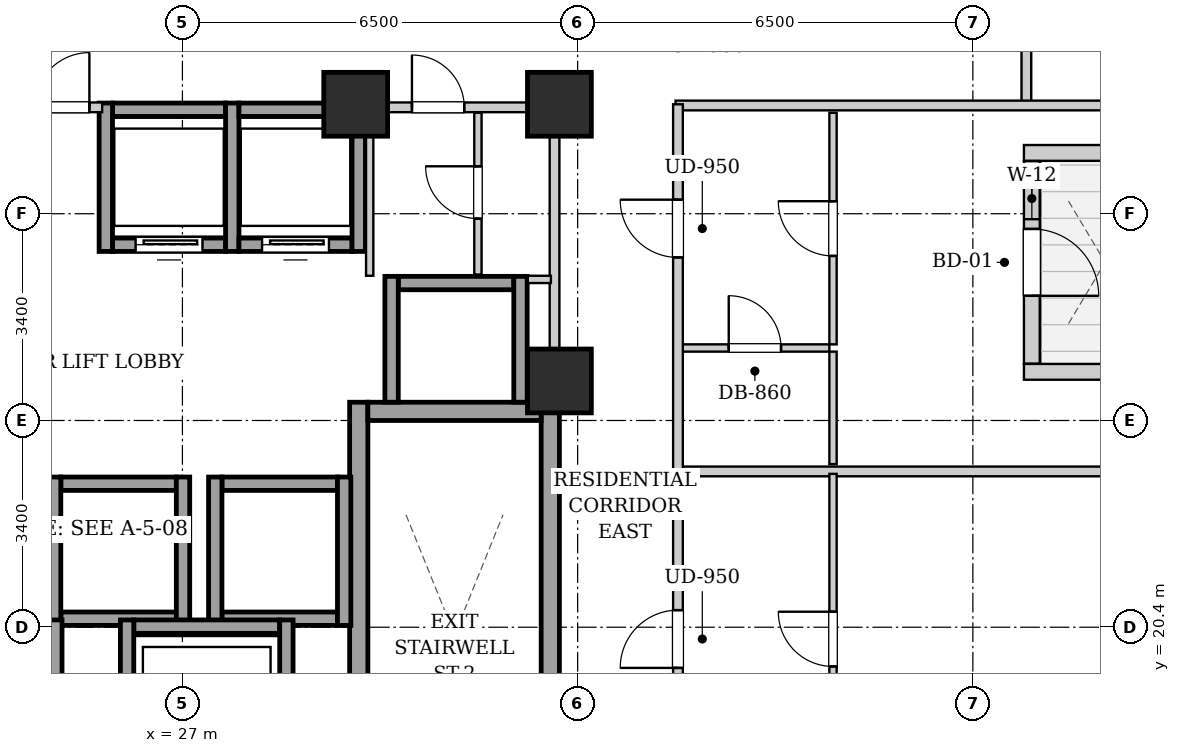
"""IFC4 building model, lengths in metres.
Left out: names, types, materials, properties, quantities, classifications, styles, units other than length and angle.
Written with IfcOpenShell. Run it as: python <this file> out.ifc"""

import sys

from ifc_helpers import new_model, si_unit, direction, frame, frame_2d, origin, origin_2d, place, context, subcontext, project, spatial, rectangle, extrude, element, fill, save


model = new_model("IFC4")
c1 = context("Model", 3, precision=1e-05, world=origin(), true_north=direction((0.0, 1.0)))
c2 = subcontext(c1, "Body", "Model", "MODEL_VIEW")
j1 = project(units=[si_unit("LENGTHUNIT", "METRE"), si_unit("PLANEANGLEUNIT", "RADIAN")], contexts=[c1])
p1 = place(None, origin())
s1 = spatial("IfcSite", under=j1, at=p1, CompositionType="ELEMENT")
p2 = place(p1, origin())
s2 = spatial("IfcBuilding", under=s1, at=p2, CompositionType="ELEMENT")
p3 = place(p2, frame((0.0, 0.0, 110.3)))
s3 = spatial("IfcBuildingStorey", under=s2, at=p3, CompositionType="ELEMENT", Elevation=110.3)
for number, where, z_axis, x_axis in (
    (1, (29.85, 29.0, 0.0), (0.0, 0.0, 1.0), (1.0, 0.0, 0.0)),
    (2, (33.2, 29.0, 0.0), (0.0, 0.0, 1.0), (1.0, 0.0, 0.0)),
    (3, (33.2, 24.45, 0.0), (0.0, 0.0, 1.0), (1.0, 0.0, 0.0)),
):
    element("IfcColumn", number, at=place(p3, frame(where, z_axis=z_axis, x_axis=x_axis)), inside=s3, PredefinedType="COLUMN", context=c2, shape_type="SweptSolid", body=[
        extrude(rectangle(XDim=1.05, YDim=1.05, at=origin_2d()), origin(), (0.0, 0.0, 1.0), 3.2),
    ])
p4 = place(p3, frame((43.24, 28.2, 0.0), z_axis=(0.0, 0.0, 1.0), x_axis=(-1.0, 0.0, 0.0)))
e4 = element("IfcWall", 4, at=p4, inside=s3, PredefinedType="SOLIDWALL", context=c2, shape_type="SweptSolid", body=[
    extrude(rectangle(XDim=2.4, YDim=0.26, at=frame_2d((1.2, 0.0))), origin(), (0.0, 0.0, 1.0), 2.94),
])
p5 = place(p3, frame((40.97, 28.066, 0.0), z_axis=(0.0, 0.0, 1.0), x_axis=(0.0, -1.0, 0.0)))
e5 = element("IfcWall", 5, at=p5, inside=s3, PredefinedType="SOLIDWALL", context=c2, shape_type="SweptSolid", body=[
    extrude(rectangle(XDim=3.332, YDim=0.26, at=frame_2d((1.666, 0.0))), origin(), (0.0, 0.0, 1.0), 2.94),
])
p6 = place(p5, frame((1.116, 0.0, 0.0)))
e6 = element("IfcOpeningElement", 6, at=p6, cuts=e5, PredefinedType="OPENING", context=c2, shape_type="SweptSolid", body=[
    extrude(rectangle(XDim=1.1, YDim=2.0, at=frame_2d((0.55, 1.0))), frame((0.0, 0.14, 0.0), z_axis=(0.0, -1.0, 0.0), x_axis=(1.0, 0.0, 0.0)), (0.0, 0.0, 1.0), 0.28),
])
p7 = place(p5, frame((0.276, 0.0, 0.55)))
e7 = element("IfcOpeningElement", 7, at=p7, cuts=e5, PredefinedType="OPENING", context=c2, shape_type="SweptSolid", body=[
    extrude(rectangle(XDim=0.68, YDim=1.2, at=frame_2d((0.34, 0.6))), frame((0.0, 0.14, 0.0), z_axis=(0.0, -1.0, 0.0), x_axis=(1.0, 0.0, 0.0)), (0.0, 0.0, 1.0), 0.28),
])
p8 = place(p3, frame((40.84, 24.6, 0.0), z_axis=(0.0, 0.0, 1.0), x_axis=(1.0, 0.0, 0.0)))
e8 = element("IfcWall", 8, at=p8, inside=s3, PredefinedType="SOLIDWALL", context=c2, shape_type="SweptSolid", body=[
    extrude(rectangle(XDim=2.4, YDim=0.26, at=frame_2d((1.2, 0.0))), origin(), (0.0, 0.0, 1.0), 2.94),
])
for number, where, z_axis, x_axis in (
    (9, (29.9, 15.1, 0.0), (0.0, 0.0, 1.0), (0.0, 1.0, 0.0)),
    (10, (33.05, 15.1, 0.0), (0.0, 0.0, 1.0), (0.0, 1.0, 0.0)),
):
    element("IfcWall", number, at=place(p3, frame(where, z_axis=z_axis, x_axis=x_axis)), inside=s3, PredefinedType="SHEAR", context=c2, shape_type="SweptSolid", body=[
        extrude(rectangle(XDim=9.0, YDim=0.3, at=frame_2d((4.5, 0.0))), origin(), (0.0, 0.0, 1.0), 2.94),
    ])
p9 = place(p3, frame((30.05, 23.95, 0.0), z_axis=(0.0, 0.0, 1.0), x_axis=(1.0, 0.0, 0.0)))
e11 = element("IfcWall", 11, at=p9, inside=s3, PredefinedType="SHEAR", context=c2, shape_type="SweptSolid", body=[
    extrude(rectangle(XDim=2.85, YDim=0.3, at=frame_2d((1.425, 0.0))), origin(), (0.0, 0.0, 1.0), 2.94),
])
p10 = place(p3, frame((25.85, 26.69, 0.0), z_axis=(0.0, 0.0, 1.0), x_axis=(1.0, 0.0, 0.0)))
e12 = element("IfcWall", 12, at=p10, inside=s3, PredefinedType="SHEAR", context=c2, shape_type="SweptSolid", body=[
    extrude(rectangle(XDim=1.86, YDim=0.22, at=frame_2d((0.93, 0.0))), origin(), (0.0, 0.0, 1.0), 2.94),
])
p11 = place(p10, frame((0.38, 0.0, 0.0)))
e13 = element("IfcOpeningElement", 13, at=p11, cuts=e12, PredefinedType="OPENING", context=c2, shape_type="SweptSolid", body=[
    extrude(rectangle(XDim=1.1, YDim=2.15, at=frame_2d((0.55, 1.075))), frame((0.0, 0.12, 0.0), z_axis=(0.0, -1.0, 0.0), x_axis=(1.0, 0.0, 0.0)), (0.0, 0.0, 1.0), 0.24),
])
p12 = place(p3, frame((25.85, 28.91, 0.0), z_axis=(0.0, 0.0, 1.0), x_axis=(1.0, 0.0, 0.0)))
e14 = element("IfcWall", 14, at=p12, inside=s3, PredefinedType="SHEAR", context=c2, shape_type="SweptSolid", body=[
    extrude(rectangle(XDim=1.86, YDim=0.22, at=frame_2d((0.93, 0.0))), origin(), (0.0, 0.0, 1.0), 2.94),
])
for number, where, z_axis, x_axis in (
    (15, (25.74, 26.58, 0.0), (0.0, 0.0, 1.0), (0.0, 1.0, 0.0)),
    (16, (27.82, 26.58, 0.0), (0.0, 0.0, 1.0), (0.0, 1.0, 0.0)),
):
    element("IfcWall", number, at=place(p3, frame(where, z_axis=z_axis, x_axis=x_axis)), inside=s3, PredefinedType="SHEAR", context=c2, shape_type="SweptSolid", body=[
        extrude(rectangle(XDim=2.44, YDim=0.22, at=frame_2d((1.22, 0.0))), origin(), (0.0, 0.0, 1.0), 2.94),
    ])
p13 = place(p3, frame((27.93, 26.69, 0.0), z_axis=(0.0, 0.0, 1.0), x_axis=(1.0, 0.0, 0.0)))
e17 = element("IfcWall", 17, at=p13, inside=s3, PredefinedType="SHEAR", context=c2, shape_type="SweptSolid", body=[
    extrude(rectangle(XDim=1.86, YDim=0.22, at=frame_2d((0.93, 0.0))), origin(), (0.0, 0.0, 1.0), 2.94),
])
p14 = place(p13, frame((0.38, 0.0, 0.0)))
e18 = element("IfcOpeningElement", 18, at=p14, cuts=e17, PredefinedType="OPENING", context=c2, shape_type="SweptSolid", body=[
    extrude(rectangle(XDim=1.1, YDim=2.15, at=frame_2d((0.55, 1.075))), frame((0.0, 0.12, 0.0), z_axis=(0.0, -1.0, 0.0), x_axis=(1.0, 0.0, 0.0)), (0.0, 0.0, 1.0), 0.24),
])
p15 = place(p3, frame((27.93, 28.91, 0.0), z_axis=(0.0, 0.0, 1.0), x_axis=(1.0, 0.0, 0.0)))
e19 = element("IfcWall", 19, at=p15, inside=s3, PredefinedType="SHEAR", context=c2, shape_type="SweptSolid", body=[
    extrude(rectangle(XDim=1.86, YDim=0.22, at=frame_2d((0.93, 0.0))), origin(), (0.0, 0.0, 1.0), 2.94),
])
p16 = place(p3, frame((29.9, 26.58, 0.0), z_axis=(0.0, 0.0, 1.0), x_axis=(0.0, 1.0, 0.0)))
e20 = element("IfcWall", 20, at=p16, inside=s3, PredefinedType="SHEAR", context=c2, shape_type="SweptSolid", body=[
    extrude(rectangle(XDim=2.44, YDim=0.22, at=frame_2d((1.22, 0.0))), origin(), (0.0, 0.0, 1.0), 2.94),
])
for number, where, z_axis, x_axis in (
    (21, (25.0, 20.54, 0.0), (0.0, 0.0, 1.0), (1.0, 0.0, 0.0)),
    (22, (25.0, 22.76, 0.0), (0.0, 0.0, 1.0), (1.0, 0.0, 0.0)),
):
    element("IfcWall", number, at=place(p3, frame(where, z_axis=z_axis, x_axis=x_axis)), inside=s3, PredefinedType="SHEAR", context=c2, shape_type="SweptSolid", body=[
        extrude(rectangle(XDim=1.9, YDim=0.22, at=frame_2d((0.95, 0.0))), origin(), (0.0, 0.0, 1.0), 2.94),
    ])
for number, where, z_axis, x_axis in (
    (23, (24.89, 20.43, 0.0), (0.0, 0.0, 1.0), (0.0, 1.0, 0.0)),
    (24, (27.01, 20.43, 0.0), (0.0, 0.0, 1.0), (0.0, 1.0, 0.0)),
):
    element("IfcWall", number, at=place(p3, frame(where, z_axis=z_axis, x_axis=x_axis)), inside=s3, PredefinedType="SHEAR", context=c2, shape_type="SweptSolid", body=[
        extrude(rectangle(XDim=2.44, YDim=0.22, at=frame_2d((1.22, 0.0))), origin(), (0.0, 0.0, 1.0), 2.94),
    ])
for number, where, z_axis, x_axis in (
    (25, (27.65, 20.54, 0.0), (0.0, 0.0, 1.0), (1.0, 0.0, 0.0)),
    (26, (27.65, 22.76, 0.0), (0.0, 0.0, 1.0), (1.0, 0.0, 0.0)),
):
    element("IfcWall", number, at=place(p3, frame(where, z_axis=z_axis, x_axis=x_axis)), inside=s3, PredefinedType="SHEAR", context=c2, shape_type="SweptSolid", body=[
        extrude(rectangle(XDim=1.9, YDim=0.22, at=frame_2d((0.95, 0.0))), origin(), (0.0, 0.0, 1.0), 2.94),
    ])
for number, where, z_axis, x_axis in (
    (27, (27.54, 20.43, 0.0), (0.0, 0.0, 1.0), (0.0, 1.0, 0.0)),
    (28, (29.66, 20.43, 0.0), (0.0, 0.0, 1.0), (0.0, 1.0, 0.0)),
):
    element("IfcWall", number, at=place(p3, frame(where, z_axis=z_axis, x_axis=x_axis)), inside=s3, PredefinedType="SHEAR", context=c2, shape_type="SweptSolid", body=[
        extrude(rectangle(XDim=2.44, YDim=0.22, at=frame_2d((1.22, 0.0))), origin(), (0.0, 0.0, 1.0), 2.94),
    ])
p17 = place(p3, frame((30.55, 26.06, 0.0), z_axis=(0.0, 0.0, 1.0), x_axis=(1.0, 0.0, 0.0)))
e29 = element("IfcWall", 29, at=p17, inside=s3, PredefinedType="SHEAR", context=c2, shape_type="SweptSolid", body=[
    extrude(rectangle(XDim=1.9, YDim=0.22, at=frame_2d((0.95, 0.0))), origin(), (0.0, 0.0, 1.0), 2.94),
])
for number, where, z_axis, x_axis in (
    (30, (30.44, 24.1, 0.0), (0.0, 0.0, 1.0), (0.0, 1.0, 0.0)),
    (31, (32.56, 24.1, 0.0), (0.0, 0.0, 1.0), (0.0, 1.0, 0.0)),
):
    element("IfcWall", number, at=place(p3, frame(where, z_axis=z_axis, x_axis=x_axis)), inside=s3, PredefinedType="SHEAR", context=c2, shape_type="SweptSolid", body=[
        extrude(rectangle(XDim=2.07, YDim=0.22, at=frame_2d((1.035, 0.0))), origin(), (0.0, 0.0, 1.0), 2.94),
    ])
p18 = place(p3, frame((24.91, 17.98, 0.0), z_axis=(0.0, 0.0, 1.0), x_axis=(0.0, 1.0, 0.0)))
e32 = element("IfcWall", 32, at=p18, inside=s3, PredefinedType="SHEAR", context=c2, shape_type="SweptSolid", body=[
    extrude(rectangle(XDim=2.54, YDim=0.22, at=frame_2d((1.27, 0.0))), origin(), (0.0, 0.0, 1.0), 2.94),
])
p19 = place(p3, frame((26.2, 20.41, 0.0), z_axis=(0.0, 0.0, 1.0), x_axis=(1.0, 0.0, 0.0)))
e33 = element("IfcWall", 33, at=p19, inside=s3, PredefinedType="SHEAR", context=c2, shape_type="SweptSolid", body=[
    extrude(rectangle(XDim=2.4, YDim=0.22, at=frame_2d((1.2, 0.0))), origin(), (0.0, 0.0, 1.0), 2.94),
])
for number, where, z_axis, x_axis in (
    (34, (26.09, 17.98, 0.0), (0.0, 0.0, 1.0), (0.0, 1.0, 0.0)),
    (35, (28.71, 17.98, 0.0), (0.0, 0.0, 1.0), (0.0, 1.0, 0.0)),
):
    element("IfcWall", number, at=place(p3, frame(where, z_axis=z_axis, x_axis=x_axis)), inside=s3, PredefinedType="SHEAR", context=c2, shape_type="SweptSolid", body=[
        extrude(rectangle(XDim=2.54, YDim=0.22, at=frame_2d((1.27, 0.0))), origin(), (0.0, 0.0, 1.0), 2.94),
    ])
p20 = place(p3, frame((33.12, 24.12, 0.0), z_axis=(0.0, 0.0, 1.0), x_axis=(0.0, 1.0, 0.0)))
e36 = element("IfcWall", 36, at=p20, inside=s3, PredefinedType="PARTITIONING", context=c2, shape_type="SweptSolid", body=[
    extrude(rectangle(XDim=4.76, YDim=0.16, at=frame_2d((2.38, 0.0))), origin(), (0.0, 0.0, 1.0), 2.94),
])
p21 = place(p3, frame((24.36, 28.95, 0.0), z_axis=(0.0, 0.0, 1.0), x_axis=(1.0, 0.0, 0.0)))
e37 = element("IfcWall", 37, at=p21, inside=s3, PredefinedType="PARTITIONING", context=c2, shape_type="SweptSolid", body=[
    extrude(rectangle(XDim=1.32, YDim=0.16, at=frame_2d((0.66, 0.0))), origin(), (0.0, 0.0, 1.0), 2.313),
])
p22 = place(p21, frame((0.21, 0.0, 0.0)))
e38 = element("IfcOpeningElement", 38, at=p22, cuts=e37, PredefinedType="OPENING", context=c2, shape_type="SweptSolid", body=[
    extrude(rectangle(XDim=0.9, YDim=2.05, at=frame_2d((0.45, 1.025))), frame((0.0, 0.09, 0.0), z_axis=(0.0, -1.0, 0.0), x_axis=(1.0, 0.0, 0.0)), (0.0, 0.0, 1.0), 0.18),
])
p23 = place(p3, frame((30.08, 26.18, 0.0), z_axis=(0.0, 0.0, 1.0), x_axis=(0.0, 1.0, 0.0)))
e39 = element("IfcWall", 39, at=p23, inside=s3, PredefinedType="PARTITIONING", context=c2, shape_type="SweptSolid", body=[
    extrude(rectangle(XDim=2.68, YDim=0.12, at=frame_2d((1.34, 0.0))), origin(), (0.0, 0.0, 1.0), 2.94),
])
p24 = place(p3, frame((32.68, 26.12, 0.0), z_axis=(0.0, 0.0, 1.0), x_axis=(1.0, 0.0, 0.0)))
e40 = element("IfcWall", 40, at=p24, inside=s3, PredefinedType="PARTITIONING", context=c2, shape_type="SweptSolid", body=[
    extrude(rectangle(XDim=0.38, YDim=0.12, at=frame_2d((0.19, 0.0))), origin(), (0.0, 0.0, 1.0), 2.94),
])
p25 = place(p3, frame((31.86, 26.2, 0.0), z_axis=(0.0, 0.0, 1.0), x_axis=(0.0, 1.0, 0.0)))
e41 = element("IfcWall", 41, at=p25, inside=s3, PredefinedType="PARTITIONING", context=c2, shape_type="SweptSolid", body=[
    extrude(rectangle(XDim=2.66, YDim=0.12, at=frame_2d((1.33, 0.0))), origin(), (0.0, 0.0, 1.0), 2.94),
])
p26 = place(p25, frame((0.92, 0.0, 0.0)))
e42 = element("IfcOpeningElement", 42, at=p26, cuts=e41, PredefinedType="OPENING", context=c2, shape_type="SweptSolid", body=[
    extrude(rectangle(XDim=0.86, YDim=2.05, at=frame_2d((0.43, 1.025))), frame((0.0, 0.07, 0.0), z_axis=(0.0, -1.0, 0.0), x_axis=(1.0, 0.0, 0.0)), (0.0, 0.0, 1.0), 0.14),
])
p27 = place(p3, frame((30.08, 28.95, 0.0), z_axis=(0.0, 0.0, 1.0), x_axis=(1.0, 0.0, 0.0)))
e43 = element("IfcWall", 43, at=p27, inside=s3, PredefinedType="PARTITIONING", context=c2, shape_type="SweptSolid", body=[
    extrude(rectangle(XDim=2.96, YDim=0.16, at=frame_2d((1.48, 0.0))), origin(), (0.0, 0.0, 1.0), 2.94),
])
p28 = place(p27, frame((0.695, 0.0, 0.0)))
e44 = element("IfcOpeningElement", 44, at=p28, cuts=e43, PredefinedType="OPENING", context=c2, shape_type="SweptSolid", body=[
    extrude(rectangle(XDim=0.86, YDim=2.05, at=frame_2d((0.43, 1.025))), frame((0.0, 0.09, 0.0), z_axis=(0.0, -1.0, 0.0), x_axis=(1.0, 0.0, 0.0)), (0.0, 0.0, 1.0), 0.18),
])
p29 = place(p3, frame((40.88, 28.98, 0.0), z_axis=(0.0, 0.0, 1.0), x_axis=(0.0, 1.0, 0.0)))
e45 = element("IfcWall", 45, at=p29, inside=s3, PredefinedType="PARTITIONING", context=c2, shape_type="SweptSolid", body=[
    extrude(rectangle(XDim=1.74, YDim=0.16, at=frame_2d((0.87, 0.0))), origin(), (0.0, 0.0, 1.0), 2.94),
])
p30 = place(p3, frame((35.11, 28.98, 0.0), z_axis=(0.0, 0.0, 1.0), x_axis=(1.0, 0.0, 0.0)))
e46 = element("IfcWall", 46, at=p30, inside=s3, PredefinedType="PARTITIONING", context=c2, shape_type="SweptSolid", body=[
    extrude(rectangle(XDim=8.01, YDim=0.16, at=frame_2d((4.005, 0.0))), origin(), (0.0, 0.0, 1.0), 2.313),
])
p31 = place(p3, frame((35.19, 22.962, 0.0), z_axis=(0.0, 0.0, 1.0), x_axis=(1.0, 0.0, 0.0)))
e47 = element("IfcWall", 47, at=p31, inside=s3, PredefinedType="PARTITIONING", context=c2, shape_type="SweptSolid", body=[
    extrude(rectangle(XDim=7.93, YDim=0.16, at=frame_2d((3.965, 0.0))), origin(), (0.0, 0.0, 1.0), 2.94),
])
p32 = place(p3, frame((37.7, 17.489, 0.0), z_axis=(0.0, 0.0, 1.0), x_axis=(0.0, 1.0, 0.0)))
e48 = element("IfcWall", 48, at=p32, inside=s3, PredefinedType="PARTITIONING", context=c2, shape_type="SweptSolid", body=[
    extrude(rectangle(XDim=5.433, YDim=0.12, at=frame_2d((2.717, 0.0))), origin(), (0.0, 0.0, 1.0), 2.94),
])
p33 = place(p32, frame((2.266, 0.0, 0.0)))
e49 = element("IfcOpeningElement", 49, at=p33, cuts=e48, PredefinedType="OPENING", context=c2, shape_type="SweptSolid", body=[
    extrude(rectangle(XDim=0.9, YDim=2.05, at=frame_2d((0.45, 1.025))), frame((0.0, 0.07, 0.0), z_axis=(0.0, -1.0, 0.0), x_axis=(1.0, 0.0, 0.0)), (0.0, 0.0, 1.0), 0.14),
])
p34 = place(p3, frame((35.19, 24.992, 0.0), z_axis=(0.0, 0.0, 1.0), x_axis=(1.0, 0.0, 0.0)))
e50 = element("IfcWall", 50, at=p34, inside=s3, PredefinedType="PARTITIONING", context=c2, shape_type="SweptSolid", body=[
    extrude(rectangle(XDim=2.45, YDim=0.12, at=frame_2d((1.225, 0.0))), origin(), (0.0, 0.0, 1.0), 2.94),
])
p35 = place(p34, frame((0.795, 0.0, 0.0)))
e51 = element("IfcOpeningElement", 51, at=p35, cuts=e50, PredefinedType="OPENING", context=c2, shape_type="SweptSolid", body=[
    extrude(rectangle(XDim=0.86, YDim=2.05, at=frame_2d((0.43, 1.025))), frame((0.0, 0.07, 0.0), z_axis=(0.0, -1.0, 0.0), x_axis=(1.0, 0.0, 0.0)), (0.0, 0.0, 1.0), 0.14),
])
p36 = place(p3, frame((37.7, 23.082, 0.0), z_axis=(0.0, 0.0, 1.0), x_axis=(0.0, 1.0, 0.0)))
e52 = element("IfcWall", 52, at=p36, inside=s3, PredefinedType="PARTITIONING", context=c2, shape_type="SweptSolid", body=[
    extrude(rectangle(XDim=1.85, YDim=0.12, at=frame_2d((0.925, 0.0))), origin(), (0.0, 0.0, 1.0), 2.94),
])
p37 = place(p3, frame((37.7, 25.052, 0.0), z_axis=(0.0, 0.0, 1.0), x_axis=(0.0, 1.0, 0.0)))
e53 = element("IfcWall", 53, at=p37, inside=s3, PredefinedType="PARTITIONING", context=c2, shape_type="SweptSolid", body=[
    extrude(rectangle(XDim=3.808, YDim=0.12, at=frame_2d((1.904, 0.0))), origin(), (0.0, 0.0, 1.0), 2.94),
])
p38 = place(p37, frame((1.454, 0.0, 0.0)))
e54 = element("IfcOpeningElement", 54, at=p38, cuts=e53, PredefinedType="OPENING", context=c2, shape_type="SweptSolid", body=[
    extrude(rectangle(XDim=0.9, YDim=2.05, at=frame_2d((0.45, 1.025))), frame((0.0, 0.07, 0.0), z_axis=(0.0, -1.0, 0.0), x_axis=(1.0, 0.0, 0.0)), (0.0, 0.0, 1.0), 0.14),
])
p39 = place(p3, frame((35.15, 15.07, 0.0), z_axis=(0.0, 0.0, 1.0), x_axis=(0.0, 1.0, 0.0)))
e55 = element("IfcWall", 55, at=p39, inside=s3, PredefinedType="PARTITIONING", context=c2, shape_type="SweptSolid", body=[
    extrude(rectangle(XDim=13.93, YDim=0.16, at=frame_2d((6.965, 0.0))), origin(), (0.0, 0.0, 1.0), 2.94),
])
p40 = place(p39, frame((4.661, 0.0, 0.0)))
e56 = element("IfcOpeningElement", 56, at=p40, cuts=e55, PredefinedType="OPENING", context=c2, shape_type="SweptSolid", body=[
    extrude(rectangle(XDim=0.95, YDim=2.1, at=frame_2d((0.475, 1.05))), frame((0.0, 0.09, 0.0), z_axis=(0.0, -1.0, 0.0), x_axis=(1.0, 0.0, 0.0)), (0.0, 0.0, 1.0), 0.18),
])
p41 = place(p39, frame((11.411, 0.0, 0.0)))
e57 = element("IfcOpeningElement", 57, at=p41, cuts=e55, PredefinedType="OPENING", context=c2, shape_type="SweptSolid", body=[
    extrude(rectangle(XDim=0.95, YDim=2.1, at=frame_2d((0.475, 1.05))), frame((0.0, 0.09, 0.0), z_axis=(0.0, -1.0, 0.0), x_axis=(1.0, 0.0, 0.0)), (0.0, 0.0, 1.0), 0.18),
])
p42 = place(p11, origin())
e58 = element("IfcDoor", 58, at=p42, inside=s3, OperationType="SLIDING_TO_LEFT", PredefinedType="DOOR", context=c2, shape_type="SweptSolid", body=[
    extrude(rectangle(XDim=1.1, YDim=2.15, at=frame_2d((0.55, 1.075))), frame((0.0, 0.025, 0.0), z_axis=(0.0, -1.0, 0.0), x_axis=(1.0, 0.0, 0.0)), (0.0, 0.0, 1.0), 0.05),
])
fill(e13, e58)
p43 = place(p14, origin())
e59 = element("IfcDoor", 59, at=p43, inside=s3, OperationType="SLIDING_TO_LEFT", PredefinedType="DOOR", context=c2, shape_type="SweptSolid", body=[
    extrude(rectangle(XDim=1.1, YDim=2.15, at=frame_2d((0.55, 1.075))), frame((0.0, 0.025, 0.0), z_axis=(0.0, -1.0, 0.0), x_axis=(1.0, 0.0, 0.0)), (0.0, 0.0, 1.0), 0.05),
])
fill(e18, e59)
p44 = place(p22, origin())
e60 = element("IfcDoor", 60, at=p44, inside=s3, OperationType="SINGLE_SWING_RIGHT", PredefinedType="DOOR", context=c2, shape_type="SweptSolid", body=[
    extrude(rectangle(XDim=0.9, YDim=2.05, at=frame_2d((0.45, 1.025))), frame((0.0, 0.025, 0.0), z_axis=(0.0, -1.0, 0.0), x_axis=(1.0, 0.0, 0.0)), (0.0, 0.0, 1.0), 0.05),
])
fill(e38, e60)
p45 = place(p26, origin())
e61 = element("IfcDoor", 61, at=p45, inside=s3, OperationType="SINGLE_SWING_RIGHT", PredefinedType="DOOR", context=c2, shape_type="SweptSolid", body=[
    extrude(rectangle(XDim=0.86, YDim=2.05, at=frame_2d((0.43, 1.025))), frame((0.0, 0.025, 0.0), z_axis=(0.0, -1.0, 0.0), x_axis=(1.0, 0.0, 0.0)), (0.0, 0.0, 1.0), 0.05),
])
fill(e42, e61)
p46 = place(p28, origin())
e62 = element("IfcDoor", 62, at=p46, inside=s3, OperationType="SINGLE_SWING_LEFT", PredefinedType="DOOR", context=c2, shape_type="SweptSolid", body=[
    extrude(rectangle(XDim=0.86, YDim=2.05, at=frame_2d((0.43, 1.025))), frame((0.0, 0.025, 0.0), z_axis=(0.0, -1.0, 0.0), x_axis=(1.0, 0.0, 0.0)), (0.0, 0.0, 1.0), 0.05),
])
fill(e44, e62)
p47 = place(p33, origin())
e63 = element("IfcDoor", 63, at=p47, inside=s3, OperationType="SINGLE_SWING_RIGHT", PredefinedType="DOOR", context=c2, shape_type="SweptSolid", body=[
    extrude(rectangle(XDim=0.9, YDim=2.05, at=frame_2d((0.45, 1.025))), frame((0.0, 0.025, 0.0), z_axis=(0.0, -1.0, 0.0), x_axis=(1.0, 0.0, 0.0)), (0.0, 0.0, 1.0), 0.05),
])
fill(e49, e63)
p48 = place(p35, origin())
e64 = element("IfcDoor", 64, at=p48, inside=s3, OperationType="SINGLE_SWING_LEFT", PredefinedType="DOOR", context=c2, shape_type="SweptSolid", body=[
    extrude(rectangle(XDim=0.86, YDim=2.05, at=frame_2d((0.43, 1.025))), frame((0.0, 0.025, 0.0), z_axis=(0.0, -1.0, 0.0), x_axis=(1.0, 0.0, 0.0)), (0.0, 0.0, 1.0), 0.05),
])
fill(e51, e64)
p49 = place(p38, origin())
e65 = element("IfcDoor", 65, at=p49, inside=s3, OperationType="SINGLE_SWING_RIGHT", PredefinedType="DOOR", context=c2, shape_type="SweptSolid", body=[
    extrude(rectangle(XDim=0.9, YDim=2.05, at=frame_2d((0.45, 1.025))), frame((0.0, 0.025, 0.0), z_axis=(0.0, -1.0, 0.0), x_axis=(1.0, 0.0, 0.0)), (0.0, 0.0, 1.0), 0.05),
])
fill(e54, e65)
p50 = place(p40, origin())
e66 = element("IfcDoor", 66, at=p50, inside=s3, OperationType="SINGLE_SWING_LEFT", PredefinedType="DOOR", context=c2, shape_type="SweptSolid", body=[
    extrude(rectangle(XDim=0.95, YDim=2.1, at=frame_2d((0.475, 1.05))), frame((0.0, 0.025, 0.0), z_axis=(0.0, -1.0, 0.0), x_axis=(1.0, 0.0, 0.0)), (0.0, 0.0, 1.0), 0.05),
])
fill(e56, e66)
p51 = place(p41, origin())
e67 = element("IfcDoor", 67, at=p51, inside=s3, OperationType="SINGLE_SWING_RIGHT", PredefinedType="DOOR", context=c2, shape_type="SweptSolid", body=[
    extrude(rectangle(XDim=0.95, YDim=2.1, at=frame_2d((0.475, 1.05))), frame((0.0, 0.025, 0.0), z_axis=(0.0, -1.0, 0.0), x_axis=(1.0, 0.0, 0.0)), (0.0, 0.0, 1.0), 0.05),
])
fill(e57, e67)
p52 = place(p6, origin())
e68 = element("IfcDoor", 68, at=p52, inside=s3, OperationType="SINGLE_SWING_RIGHT", PredefinedType="DOOR", context=c2, shape_type="SweptSolid", body=[
    extrude(rectangle(XDim=1.1, YDim=2.0, at=frame_2d((0.55, 1.0))), frame((0.0, 0.025, 0.0), z_axis=(0.0, -1.0, 0.0), x_axis=(1.0, 0.0, 0.0)), (0.0, 0.0, 1.0), 0.05),
])
fill(e6, e68)
p53 = place(p7, origin())
e69 = element("IfcWindow", 69, at=p53, inside=s3, PartitioningType="SINGLE_PANEL", PredefinedType="WINDOW", context=c2, shape_type="SweptSolid", body=[
    extrude(rectangle(XDim=0.68, YDim=1.2, at=frame_2d((0.34, 0.6))), frame((0.0, 0.03, 0.0), z_axis=(0.0, -1.0, 0.0), x_axis=(1.0, 0.0, 0.0)), (0.0, 0.0, 1.0), 0.06),
])
fill(e7, e69)
save(model, sys.argv[1])
